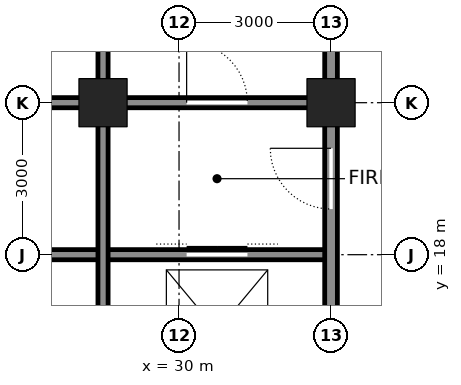
"""IFC4 building model, lengths in metres.
Left out: names, types, materials, properties, quantities, classifications, styles, units other than length and angle.
Written with IfcOpenShell. Run it as: python <this file> out.ifc"""

import sys

from ifc_helpers import new_model, si_unit, direction, frame, frame_2d, origin, origin_2d, place, context, subcontext, project, spatial, rectangle, hollow_rectangle, extrude, element, fill, save


model = new_model("IFC4")
c1 = context("Model", 3, precision=1e-05, world=origin(), true_north=direction((0.0, 1.0)))
c2 = subcontext(c1, "Body", "Model", "MODEL_VIEW")
j1 = project(units=[si_unit("LENGTHUNIT", "METRE"), si_unit("PLANEANGLEUNIT", "RADIAN")], contexts=[c1])
p1 = place(None, origin())
s1 = spatial("IfcSite", under=j1, at=p1, CompositionType="ELEMENT")
p2 = place(p1, origin())
s2 = spatial("IfcBuilding", under=s1, at=p2, CompositionType="ELEMENT")
p3 = place(p2, frame((0.0, 0.0, 6.0)))
s3 = spatial("IfcBuildingStorey", under=s2, at=p3, CompositionType="ELEMENT", Elevation=6.0)
for number, where, z_axis, x_axis in (
    (1, (33.0, 21.0, 0.0), (0.0, 0.0, 1.0), (1.0, 0.0, 0.0)),
    (2, (28.5, 21.0, 0.0), (0.0, 0.0, 1.0), (1.0, 0.0, 0.0)),
):
    element("IfcColumn", number, at=place(p3, frame(where, z_axis=z_axis, x_axis=x_axis)), inside=s3, PredefinedType="COLUMN", context=c2, shape_type="SweptSolid", body=[
        extrude(hollow_rectangle(XDim=0.95, YDim=0.95, WallThickness=0.095, at=origin_2d()), origin(), (0.0, 0.0, 1.0), 7.5),
    ])
p4 = place(p3, frame((25.5, 18.0, 0.0), z_axis=(0.0, 0.0, 1.0), x_axis=(1.0, 0.0, 0.0)))
e3 = element("IfcWall", 3, at=p4, inside=s3, PredefinedType="SOLIDWALL", context=c2, shape_type="SweptSolid", body=[
    extrude(rectangle(XDim=7.5, YDim=0.2, at=frame_2d((3.75, 0.0))), origin(), (0.0, 0.0, 1.0), 7.3),
])
p5 = place(p4, frame((4.65, 0.0, 0.0)))
e4 = element("IfcOpeningElement", 4, at=p5, cuts=e3, PredefinedType="OPENING", context=c2, shape_type="SweptSolid", body=[
    extrude(rectangle(XDim=1.2, YDim=2.1, at=frame_2d((0.6, 1.05))), frame((0.0, 0.11, 0.0), z_axis=(0.0, -1.0, 0.0), x_axis=(1.0, 0.0, 0.0)), (0.0, 0.0, 1.0), 0.22),
])
p6 = place(p3, frame((25.5, 21.0, 0.0), z_axis=(0.0, 0.0, 1.0), x_axis=(1.0, 0.0, 0.0)))
e5 = element("IfcWall", 5, at=p6, inside=s3, PredefinedType="SOLIDWALL", context=c2, shape_type="SweptSolid", body=[
    extrude(rectangle(XDim=2.75, YDim=0.2, at=frame_2d((1.375, 0.0))), origin(), (0.0, 0.0, 1.0), 6.35),
])
p7 = place(p3, frame((28.75, 21.0, 0.0), z_axis=(0.0, 0.0, 1.0), x_axis=(1.0, 0.0, 0.0)))
e6 = element("IfcWall", 6, at=p7, inside=s3, PredefinedType="SOLIDWALL", context=c2, shape_type="SweptSolid", body=[
    extrude(rectangle(XDim=4.0, YDim=0.2, at=frame_2d((2.0, 0.0))), origin(), (0.0, 0.0, 1.0), 6.35),
])
p8 = place(p7, frame((1.4, 0.0, 0.0)))
e7 = element("IfcOpeningElement", 7, at=p8, cuts=e6, PredefinedType="OPENING", context=c2, shape_type="SweptSolid", body=[
    extrude(rectangle(XDim=1.2, YDim=2.1, at=frame_2d((0.6, 1.05))), frame((0.0, 0.11, 0.0), z_axis=(0.0, -1.0, 0.0), x_axis=(1.0, 0.0, 0.0)), (0.0, 0.0, 1.0), 0.22),
])
p9 = place(p3, frame((28.5, 12.25, 0.0), z_axis=(0.0, 0.0, 1.0), x_axis=(0.0, 1.0, 0.0)))
e8 = element("IfcWall", 8, at=p9, inside=s3, PredefinedType="SOLIDWALL", context=c2, shape_type="SweptSolid", body=[
    extrude(rectangle(XDim=8.5, YDim=0.2, at=frame_2d((4.25, 0.0))), origin(), (0.0, 0.0, 1.0), 6.373),
])
p10 = place(p3, frame((28.5, 21.25, 0.0), z_axis=(0.0, 0.0, 1.0), x_axis=(0.0, 1.0, 0.0)))
e9 = element("IfcWall", 9, at=p10, inside=s3, PredefinedType="SOLIDWALL", context=c2, shape_type="SweptSolid", body=[
    extrude(rectangle(XDim=2.5, YDim=0.2, at=frame_2d((1.25, 0.0))), origin(), (0.0, 0.0, 1.0), 6.373),
])
p11 = place(p3, frame((33.0, 12.25, 0.0), z_axis=(0.0, 0.0, 1.0), x_axis=(0.0, 1.0, 0.0)))
e10 = element("IfcWall", 10, at=p11, inside=s3, PredefinedType="SOLIDWALL", context=c2, shape_type="SweptSolid", body=[
    extrude(rectangle(XDim=8.5, YDim=0.25, at=frame_2d((4.25, 0.0))), origin(), (0.0, 0.0, 1.0), 6.373),
])
p12 = place(p11, frame((6.65, 0.0, 0.0)))
e11 = element("IfcOpeningElement", 11, at=p12, cuts=e10, PredefinedType="OPENING", context=c2, shape_type="SweptSolid", body=[
    extrude(rectangle(XDim=1.2, YDim=2.1, at=frame_2d((0.6, 1.05))), frame((0.0, 0.135, 0.0), z_axis=(0.0, -1.0, 0.0), x_axis=(1.0, 0.0, 0.0)), (0.0, 0.0, 1.0), 0.27),
])
p13 = place(p11, frame((0.875, 0.0, 0.0)))
e12 = element("IfcOpeningElement", 12, at=p13, cuts=e10, PredefinedType="OPENING", context=c2, shape_type="SweptSolid", body=[
    extrude(rectangle(XDim=0.75, YDim=2.1, at=frame_2d((0.375, 1.05))), frame((0.0, 0.135, 0.0), z_axis=(0.0, -1.0, 0.0), x_axis=(1.0, 0.0, 0.0)), (0.0, 0.0, 1.0), 0.27),
])
p14 = place(p3, frame((33.0, 21.25, 0.0), z_axis=(0.0, 0.0, 1.0), x_axis=(0.0, 1.0, 0.0)))
e13 = element("IfcWall", 13, at=p14, inside=s3, PredefinedType="SOLIDWALL", context=c2, shape_type="SweptSolid", body=[
    extrude(rectangle(XDim=2.5, YDim=0.25, at=frame_2d((1.25, 0.0))), origin(), (0.0, 0.0, 1.0), 6.373),
])
p15 = place(p8, origin())
e14 = element("IfcDoor", 14, at=p15, inside=s3, OperationType="SINGLE_SWING_LEFT", PredefinedType="DOOR", context=c2, shape_type="SweptSolid", body=[
    extrude(rectangle(XDim=1.2, YDim=2.1, at=frame_2d((0.6, 1.05))), frame((0.0, 0.025, 0.0), z_axis=(0.0, -1.0, 0.0), x_axis=(1.0, 0.0, 0.0)), (0.0, 0.0, 1.0), 0.05),
])
fill(e7, e14)
p16 = place(p12, origin())
e15 = element("IfcDoor", 15, at=p16, inside=s3, OperationType="SINGLE_SWING_RIGHT", PredefinedType="DOOR", context=c2, shape_type="SweptSolid", body=[
    extrude(rectangle(XDim=1.2, YDim=2.1, at=frame_2d((0.6, 1.05))), frame((0.0, 0.025, 0.0), z_axis=(0.0, -1.0, 0.0), x_axis=(1.0, 0.0, 0.0)), (0.0, 0.0, 1.0), 0.05),
])
fill(e11, e15)
p17 = place(p5, origin())
e16 = element("IfcDoor", 16, at=p17, inside=s3, OperationType="DOUBLE_DOOR_SLIDING", PredefinedType="DOOR", context=c2, shape_type="SweptSolid", body=[
    extrude(rectangle(XDim=1.2, YDim=2.1, at=frame_2d((0.6, 1.05))), frame((0.0, 0.025, 0.0), z_axis=(0.0, -1.0, 0.0), x_axis=(1.0, 0.0, 0.0)), (0.0, 0.0, 1.0), 0.05),
])
fill(e4, e16)
save(model, sys.argv[1])
